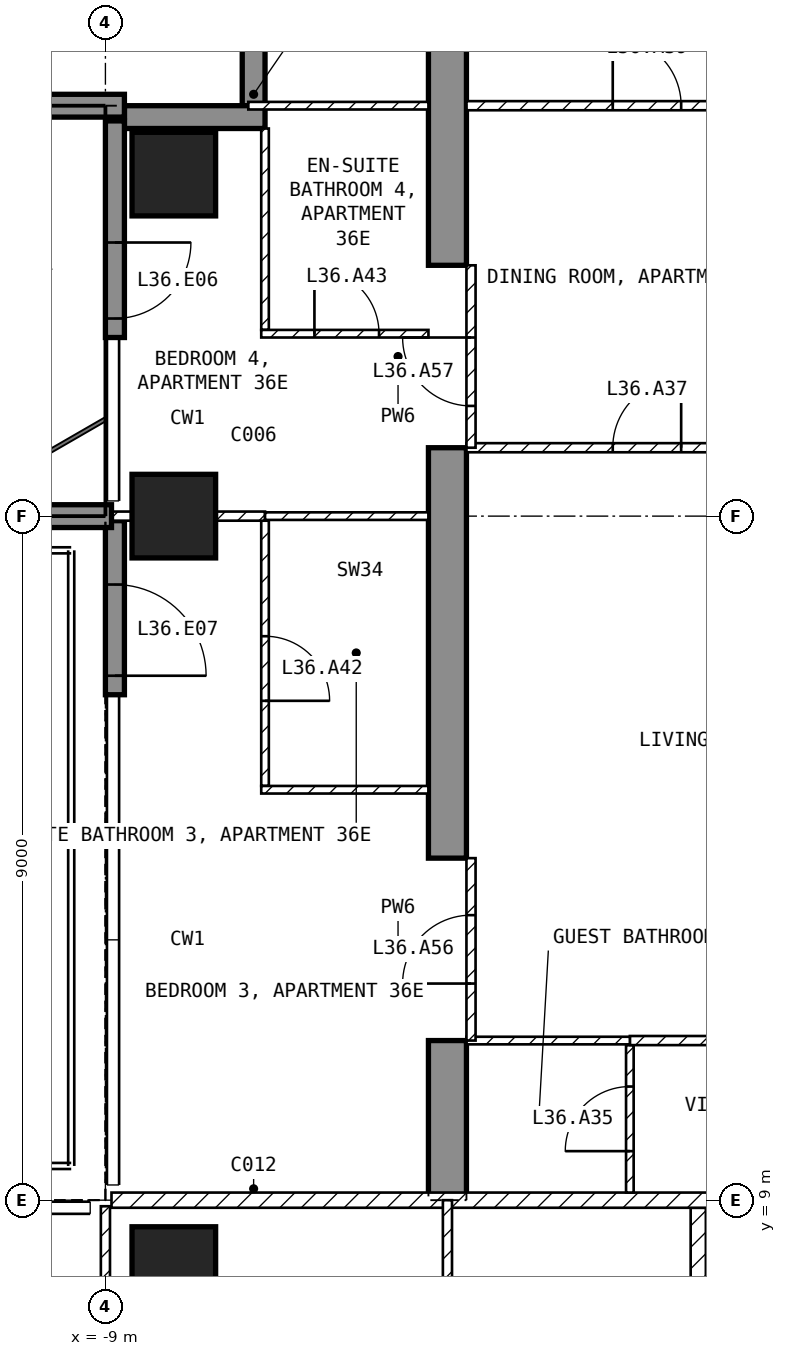
"""IFC4 building model, lengths in metres.
Left out: names, types, materials, properties, quantities, classifications, styles, units other than length and angle.
Written with IfcOpenShell. Run it as: python <this file> out.ifc"""

import sys

from ifc_helpers import new_model, si_unit, direction, frame, frame_2d, origin, origin_2d, place, context, subcontext, project, spatial, polyline, rectangle, outline, extrude, element, fill, save


model = new_model("IFC4")
c1 = context("Model", 3, precision=1e-05, world=origin(), true_north=direction((0.0, 1.0)))
c2 = subcontext(c1, "Body", "Model", "MODEL_VIEW")
j1 = project(units=[si_unit("LENGTHUNIT", "METRE"), si_unit("PLANEANGLEUNIT", "RADIAN")], contexts=[c1])
p1 = place(None, origin())
s1 = spatial("IfcSite", under=j1, at=p1, CompositionType="ELEMENT")
p2 = place(p1, origin())
s2 = spatial("IfcBuilding", under=s1, at=p2, CompositionType="ELEMENT")
p3 = place(p2, frame((0.0, 0.0, 147.9)))
s3 = spatial("IfcBuildingStorey", under=s2, at=p3, CompositionType="ELEMENT", Elevation=147.9)
for number, where, z_axis, x_axis in (
    (1, (-8.1, 8.1, -0.25), (0.0, 0.0, 1.0), (1.0, 0.0, 0.0)),
    (2, (-8.1, 18.0, -0.25), (0.0, 0.0, 1.0), (1.0, 0.0, 0.0)),
    (3, (-8.1, 22.5, -0.25), (0.0, 0.0, 1.0), (1.0, 0.0, 0.0)),
):
    element("IfcColumn", number, at=place(p3, frame(where, z_axis=z_axis, x_axis=x_axis)), inside=s3, PredefinedType="COLUMN", context=c2, shape_type="SweptSolid", body=[
        extrude(rectangle(XDim=1.1, YDim=1.1, at=origin_2d()), origin(), (0.0, 0.0, 1.0), 3.5),
    ])
p4 = place(p3, frame((-4.75, 9.0, -0.25), z_axis=(1.0, 0.0, 0.0), x_axis=(0.0, 1.0, 0.0)))
e4 = element("IfcWall", 4, at=p4, inside=s3, PredefinedType="SHEAR", context=c2, shape_type="SweptSolid", body=[
    extrude(outline(polyline([(0.0, 0.0), (2.1, 0.0), (2.1, 2.65), (4.5, 2.65), (4.5, 0.0), (9.9, 0.0), (9.9, 2.65), (12.3, 2.65), (12.3, 0.0), (16.55, 0.0), (16.55, 3.5), (0.0, 3.5), (0.0, 0.0)])), origin(), (0.0, 0.0, 1.0), 0.5),
])
p5 = place(p3, frame((-8.875, 23.2, 0.0), z_axis=(0.0, 0.0, 1.0), x_axis=(0.0, -1.0, 0.0)))
e5 = element("IfcWall", 5, at=p5, inside=s3, PredefinedType="SOLIDWALL", context=c2, shape_type="SweptSolid", body=[
    extrude(rectangle(XDim=2.85, YDim=0.25, at=frame_2d((1.425, 0.0))), origin(), (0.0, 0.0, 1.0), 3.25),
])
p6 = place(p5, frame((1.6, 0.0, 0.0)))
e6 = element("IfcOpeningElement", 6, at=p6, cuts=e5, PredefinedType="OPENING", context=c2, shape_type="SweptSolid", body=[
    extrude(rectangle(XDim=1.0, YDim=2.4, at=frame_2d((0.5, 1.2))), frame((0.0, 0.135, 0.0), z_axis=(0.0, -1.0, 0.0), x_axis=(1.0, 0.0, 0.0)), (0.0, 0.0, 1.0), 0.27),
])
p7 = place(p3, frame((-8.875, 17.94, 0.0), z_axis=(0.0, 0.0, 1.0), x_axis=(0.0, -1.0, 0.0)))
e7 = element("IfcWall", 7, at=p7, inside=s3, PredefinedType="SOLIDWALL", context=c2, shape_type="SweptSolid", body=[
    extrude(rectangle(XDim=2.29, YDim=0.25, at=frame_2d((1.145, 0.0))), origin(), (0.0, 0.0, 1.0), 3.25),
])
p8 = place(p7, frame((0.84, 0.0, 0.0)))
e8 = element("IfcOpeningElement", 8, at=p8, cuts=e7, PredefinedType="OPENING", context=c2, shape_type="SweptSolid", body=[
    extrude(rectangle(XDim=1.2, YDim=2.4, at=frame_2d((0.6, 1.2))), frame((0.0, 0.135, 0.0), z_axis=(0.0, -1.0, 0.0), x_axis=(1.0, 0.0, 0.0)), (0.0, 0.0, 1.0), 0.27),
])
p9 = place(p3, frame((-7.05, 25.2, 0.0), z_axis=(0.0, 0.0, 1.0), x_axis=(0.0, -1.0, 0.0)))
e9 = element("IfcWall", 9, at=p9, inside=s3, PredefinedType="SOLIDWALL", context=c2, shape_type="SweptSolid", body=[
    extrude(rectangle(XDim=1.8, YDim=0.3, at=frame_2d((0.9, 0.0))), origin(), (0.0, 0.0, 1.0), 3.25),
])
p10 = place(p3, frame((-6.9, 23.25, 0.0), z_axis=(0.0, 0.0, 1.0), x_axis=(-1.0, 0.0, 0.0)))
e10 = element("IfcWall", 10, at=p10, inside=s3, PredefinedType="SOLIDWALL", context=c2, shape_type="SweptSolid", body=[
    extrude(rectangle(XDim=1.85, YDim=0.3, at=frame_2d((0.925, 0.0))), origin(), (0.0, 0.0, 1.0), 3.25),
])
p11 = place(p3, frame((-8.92, 18.0, 0.0), z_axis=(0.0, 0.0, 1.0), x_axis=(-1.0, 0.0, 0.0)))
e11 = element("IfcWall", 11, at=p11, inside=s3, PredefinedType="SOLIDWALL", context=c2, shape_type="SweptSolid", body=[
    extrude(rectangle(XDim=2.82, YDim=0.3, at=frame_2d((1.41, 0.0))), origin(), (0.0, 0.0, 1.0), 3.25),
])
p12 = place(p3, frame((-8.75, 23.4, 0.0), z_axis=(0.0, 0.0, 1.0), x_axis=(-1.0, 0.0, 0.0)))
e12 = element("IfcWall", 12, at=p12, inside=s3, PredefinedType="SOLIDWALL", context=c2, shape_type="SweptSolid", body=[
    extrude(rectangle(XDim=2.95, YDim=0.3, at=frame_2d((1.475, 0.0))), origin(), (0.0, 0.0, 1.0), 3.25),
])
p13 = place(p3, frame((-1.2, 4.6, 0.0), z_axis=(0.0, 0.0, 1.0), x_axis=(0.0, 1.0, 0.0)))
e13 = element("IfcWall", 13, at=p13, inside=s3, PredefinedType="PARTITIONING", context=c2, shape_type="SweptSolid", body=[
    extrude(rectangle(XDim=4.3, YDim=0.2, at=frame_2d((2.15, 0.0))), origin(), (0.0, 0.0, 1.0), 3.25),
])
p14 = place(p3, frame((-8.92, 9.0, 0.0), z_axis=(0.0, 0.0, 1.0), x_axis=(1.0, 0.0, 0.0)))
e14 = element("IfcWall", 14, at=p14, inside=s3, PredefinedType="PARTITIONING", context=c2, shape_type="SweptSolid", body=[
    extrude(rectangle(XDim=17.84, YDim=0.2, at=frame_2d((8.92, 0.0))), origin(), (0.0, 0.0, 1.0), 3.25),
])
p15 = place(p14, frame((8.42, 0.0, 0.0)))
e15 = element("IfcOpeningElement", 15, at=p15, cuts=e14, PredefinedType="OPENING", context=c2, shape_type="SweptSolid", body=[
    extrude(rectangle(XDim=1.0, YDim=2.1, at=frame_2d((0.5, 1.05))), frame((0.0, 0.11, 0.0), z_axis=(0.0, -1.0, 0.0), x_axis=(1.0, 0.0, 0.0)), (0.0, 0.0, 1.0), 0.22),
])
p16 = place(p3, frame((-9.0, 8.92, 0.0), z_axis=(0.0, 0.0, 1.0), x_axis=(0.0, -1.0, 0.0)))
e16 = element("IfcWall", 16, at=p16, inside=s3, PredefinedType="PARTITIONING", context=c2, shape_type="SweptSolid", body=[
    extrude(rectangle(XDim=7.62, YDim=0.12, at=frame_2d((3.81, 0.0))), origin(), (0.0, 0.0, 1.0), 3.25),
])
p17 = place(p16, frame((5.87, 0.0, 0.0)))
e17 = element("IfcOpeningElement", 17, at=p17, cuts=e16, PredefinedType="OPENING", context=c2, shape_type="SweptSolid", body=[
    extrude(rectangle(XDim=0.9, YDim=2.1, at=frame_2d((0.45, 1.05))), frame((0.0, 0.07, 0.0), z_axis=(0.0, -1.0, 0.0), x_axis=(1.0, 0.0, 0.0)), (0.0, 0.0, 1.0), 0.14),
])
p18 = place(p3, frame((-4.5, 9.0, 0.0), z_axis=(0.0, 0.0, 1.0), x_axis=(0.0, -1.0, 0.0)))
e18 = element("IfcWall", 18, at=p18, inside=s3, PredefinedType="PARTITIONING", context=c2, shape_type="SweptSolid", body=[
    extrude(rectangle(XDim=4.5, YDim=0.12, at=frame_2d((2.25, 0.0))), origin(), (0.0, 0.0, 1.0), 3.25),
])
p19 = place(p18, frame((1.8, 0.0, 0.0)))
e19 = element("IfcOpeningElement", 19, at=p19, cuts=e18, PredefinedType="OPENING", context=c2, shape_type="SweptSolid", body=[
    extrude(rectangle(XDim=0.9, YDim=2.1, at=frame_2d((0.45, 1.05))), frame((0.0, 0.07, 0.0), z_axis=(0.0, -1.0, 0.0), x_axis=(1.0, 0.0, 0.0)), (0.0, 0.0, 1.0), 0.14),
])
p20 = place(p3, frame((-2.1, 9.1, 0.0), z_axis=(0.0, 0.0, 1.0), x_axis=(0.0, 1.0, 0.0)))
e20 = element("IfcWall", 20, at=p20, inside=s3, PredefinedType="PARTITIONING", context=c2, shape_type="SweptSolid", body=[
    extrude(rectangle(XDim=1.94, YDim=0.1, at=frame_2d((0.97, 0.0))), origin(), (0.0, 0.0, 1.0), 3.25),
])
p21 = place(p20, frame((0.545, 0.0, 0.0)))
e21 = element("IfcOpeningElement", 21, at=p21, cuts=e20, PredefinedType="OPENING", context=c2, shape_type="SweptSolid", body=[
    extrude(rectangle(XDim=0.85, YDim=2.1, at=frame_2d((0.425, 1.05))), frame((0.0, 0.06, 0.0), z_axis=(0.0, -1.0, 0.0), x_axis=(1.0, 0.0, 0.0)), (0.0, 0.0, 1.0), 0.12),
])
p22 = place(p3, frame((-2.1, 11.1, 0.0), z_axis=(0.0, 0.0, 1.0), x_axis=(1.0, 0.0, 0.0)))
e22 = element("IfcWall", 22, at=p22, inside=s3, PredefinedType="PARTITIONING", context=c2, shape_type="SweptSolid", body=[
    extrude(rectangle(XDim=6.35, YDim=0.12, at=frame_2d((3.175, 0.0))), origin(), (0.0, 0.0, 1.0), 3.25),
])
p23 = place(p22, frame((2.725, 0.0, 0.0)))
e23 = element("IfcOpeningElement", 23, at=p23, cuts=e22, PredefinedType="OPENING", context=c2, shape_type="SweptSolid", body=[
    extrude(rectangle(XDim=0.9, YDim=2.1, at=frame_2d((0.45, 1.05))), frame((0.0, 0.07, 0.0), z_axis=(0.0, -1.0, 0.0), x_axis=(1.0, 0.0, 0.0)), (0.0, 0.0, 1.0), 0.14),
])
p24 = place(p3, frame((-4.25, 11.1, 0.0), z_axis=(0.0, 0.0, 1.0), x_axis=(1.0, 0.0, 0.0)))
e24 = element("IfcWall", 24, at=p24, inside=s3, PredefinedType="PARTITIONING", context=c2, shape_type="SweptSolid", body=[
    extrude(rectangle(XDim=2.15, YDim=0.1, at=frame_2d((1.075, 0.0))), origin(), (0.0, 0.0, 1.0), 3.25),
])
p25 = place(p3, frame((-4.25, 18.9, 0.0), z_axis=(0.0, 0.0, 1.0), x_axis=(1.0, 0.0, 0.0)))
e25 = element("IfcWall", 25, at=p25, inside=s3, PredefinedType="PARTITIONING", context=c2, shape_type="SweptSolid", body=[
    extrude(rectangle(XDim=8.5, YDim=0.12, at=frame_2d((4.25, 0.0))), origin(), (0.0, 0.0, 1.0), 3.25),
])
p26 = place(p25, frame((1.925, 0.0, 0.0)))
e26 = element("IfcOpeningElement", 26, at=p26, cuts=e25, PredefinedType="OPENING", context=c2, shape_type="SweptSolid", body=[
    extrude(rectangle(XDim=0.9, YDim=2.1, at=frame_2d((0.45, 1.05))), frame((0.0, 0.07, 0.0), z_axis=(0.0, -1.0, 0.0), x_axis=(1.0, 0.0, 0.0)), (0.0, 0.0, 1.0), 0.14),
])
p27 = place(p3, frame((-4.25, 23.4, 0.0), z_axis=(0.0, 0.0, 1.0), x_axis=(1.0, 0.0, 0.0)))
e27 = element("IfcWall", 27, at=p27, inside=s3, PredefinedType="PARTITIONING", context=c2, shape_type="SweptSolid", body=[
    extrude(rectangle(XDim=8.5, YDim=0.12, at=frame_2d((4.25, 0.0))), origin(), (0.0, 0.0, 1.0), 3.25),
])
p28 = place(p27, frame((1.925, 0.0, 0.0)))
e28 = element("IfcOpeningElement", 28, at=p28, cuts=e27, PredefinedType="OPENING", context=c2, shape_type="SweptSolid", body=[
    extrude(rectangle(XDim=0.9, YDim=2.1, at=frame_2d((0.45, 1.05))), frame((0.0, 0.07, 0.0), z_axis=(0.0, -1.0, 0.0), x_axis=(1.0, 0.0, 0.0)), (0.0, 0.0, 1.0), 0.14),
])
p29 = place(p3, frame((-6.9, 17.94, 0.0), z_axis=(0.0, 0.0, 1.0), x_axis=(0.0, -1.0, 0.0)))
e29 = element("IfcWall", 29, at=p29, inside=s3, PredefinedType="PARTITIONING", context=c2, shape_type="SweptSolid", body=[
    extrude(rectangle(XDim=3.49, YDim=0.1, at=frame_2d((1.745, 0.0))), origin(), (0.0, 0.0, 1.0), 3.25),
])
p30 = place(p29, frame((1.52, 0.0, 0.0)))
e30 = element("IfcOpeningElement", 30, at=p30, cuts=e29, PredefinedType="OPENING", context=c2, shape_type="SweptSolid", body=[
    extrude(rectangle(XDim=0.85, YDim=2.1, at=frame_2d((0.425, 1.05))), frame((0.0, 0.06, 0.0), z_axis=(0.0, -1.0, 0.0), x_axis=(1.0, 0.0, 0.0)), (0.0, 0.0, 1.0), 0.12),
])
p31 = place(p3, frame((-6.95, 14.4, 0.0), z_axis=(0.0, 0.0, 1.0), x_axis=(1.0, 0.0, 0.0)))
e31 = element("IfcWall", 31, at=p31, inside=s3, PredefinedType="PARTITIONING", context=c2, shape_type="SweptSolid", body=[
    extrude(rectangle(XDim=2.2, YDim=0.1, at=frame_2d((1.1, 0.0))), origin(), (0.0, 0.0, 1.0), 3.25),
])
p32 = place(p3, frame((-8.92, 18.0, 0.0), z_axis=(0.0, 0.0, 1.0), x_axis=(1.0, 0.0, 0.0)))
e32 = element("IfcWall", 32, at=p32, inside=s3, PredefinedType="PARTITIONING", context=c2, shape_type="SweptSolid", body=[
    extrude(rectangle(XDim=2.02, YDim=0.12, at=frame_2d((1.01, 0.0))), origin(), (0.0, 0.0, 1.0), 2.414),
])
p33 = place(p3, frame((-6.9, 18.0, 0.0), z_axis=(0.0, 0.0, 1.0), x_axis=(1.0, 0.0, 0.0)))
e33 = element("IfcWall", 33, at=p33, inside=s3, PredefinedType="PARTITIONING", context=c2, shape_type="SweptSolid", body=[
    extrude(rectangle(XDim=2.15, YDim=0.1, at=frame_2d((1.075, 0.0))), origin(), (0.0, 0.0, 1.0), 2.414),
])
p34 = place(p3, frame((-6.9, 23.1, 0.0), z_axis=(0.0, 0.0, 1.0), x_axis=(0.0, -1.0, 0.0)))
e34 = element("IfcWall", 34, at=p34, inside=s3, PredefinedType="PARTITIONING", context=c2, shape_type="SweptSolid", body=[
    extrude(rectangle(XDim=2.65, YDim=0.1, at=frame_2d((1.325, 0.0))), origin(), (0.0, 0.0, 1.0), 3.25),
])
p35 = place(p3, frame((-6.95, 20.4, 0.0), z_axis=(0.0, 0.0, 1.0), x_axis=(1.0, 0.0, 0.0)))
e35 = element("IfcWall", 35, at=p35, inside=s3, PredefinedType="PARTITIONING", context=c2, shape_type="SweptSolid", body=[
    extrude(rectangle(XDim=2.2, YDim=0.1, at=frame_2d((1.1, 0.0))), origin(), (0.0, 0.0, 1.0), 3.25),
])
p36 = place(p35, frame((0.7, 0.0, 0.0)))
e36 = element("IfcOpeningElement", 36, at=p36, cuts=e35, PredefinedType="OPENING", context=c2, shape_type="SweptSolid", body=[
    extrude(rectangle(XDim=0.85, YDim=2.1, at=frame_2d((0.425, 1.05))), frame((0.0, 0.06, 0.0), z_axis=(0.0, -1.0, 0.0), x_axis=(1.0, 0.0, 0.0)), (0.0, 0.0, 1.0), 0.12),
])
p37 = place(p3, frame((-7.12, 23.4, 0.0), z_axis=(0.0, 0.0, 1.0), x_axis=(1.0, 0.0, 0.0)))
e37 = element("IfcWall", 37, at=p37, inside=s3, PredefinedType="PARTITIONING", context=c2, shape_type="SweptSolid", body=[
    extrude(rectangle(XDim=2.37, YDim=0.1, at=frame_2d((1.185, 0.0))), origin(), (0.0, 0.0, 1.0), 3.25),
])
p38 = place(p3, frame((-4.19, 11.1, 0.0), z_axis=(0.0, 0.0, 1.0), x_axis=(0.0, 1.0, 0.0)))
e38 = element("IfcWall", 38, at=p38, inside=s3, PredefinedType="PARTITIONING", context=c2, shape_type="SweptSolid", body=[
    extrude(rectangle(XDim=2.4, YDim=0.12, at=frame_2d((1.2, 0.0))), origin(), (0.0, 0.0, 1.0), 2.4),
])
p39 = place(p38, frame((0.75, 0.0, 0.0)))
e39 = element("IfcOpeningElement", 39, at=p39, cuts=e38, PredefinedType="OPENING", context=c2, shape_type="SweptSolid", body=[
    extrude(rectangle(XDim=0.9, YDim=2.1, at=frame_2d((0.45, 1.05))), frame((0.0, 0.07, 0.0), z_axis=(0.0, -1.0, 0.0), x_axis=(1.0, 0.0, 0.0)), (0.0, 0.0, 1.0), 0.14),
])
p40 = place(p3, frame((-4.19, 18.9, 0.0), z_axis=(0.0, 0.0, 1.0), x_axis=(0.0, 1.0, 0.0)))
e40 = element("IfcWall", 40, at=p40, inside=s3, PredefinedType="PARTITIONING", context=c2, shape_type="SweptSolid", body=[
    extrude(rectangle(XDim=2.4, YDim=0.12, at=frame_2d((1.2, 0.0))), origin(), (0.0, 0.0, 1.0), 2.4),
])
p41 = place(p40, frame((0.55, 0.0, 0.0)))
e41 = element("IfcOpeningElement", 41, at=p41, cuts=e40, PredefinedType="OPENING", context=c2, shape_type="SweptSolid", body=[
    extrude(rectangle(XDim=0.9, YDim=2.1, at=frame_2d((0.45, 1.05))), frame((0.0, 0.07, 0.0), z_axis=(0.0, -1.0, 0.0), x_axis=(1.0, 0.0, 0.0)), (0.0, 0.0, 1.0), 0.14),
])
p42 = place(p6, origin())
e42 = element("IfcDoor", 42, at=p42, inside=s3, OperationType="SINGLE_SWING_LEFT", PredefinedType="DOOR", context=c2, shape_type="SweptSolid", body=[
    extrude(rectangle(XDim=1.0, YDim=2.4, at=frame_2d((0.5, 1.2))), frame((0.0, 0.025, 0.0), z_axis=(0.0, -1.0, 0.0), x_axis=(1.0, 0.0, 0.0)), (0.0, 0.0, 1.0), 0.05),
])
fill(e6, e42)
p43 = place(p8, origin())
e43 = element("IfcDoor", 43, at=p43, inside=s3, OperationType="SINGLE_SWING_RIGHT", PredefinedType="DOOR", context=c2, shape_type="SweptSolid", body=[
    extrude(rectangle(XDim=1.2, YDim=2.4, at=frame_2d((0.6, 1.2))), frame((0.0, 0.025, 0.0), z_axis=(0.0, -1.0, 0.0), x_axis=(1.0, 0.0, 0.0)), (0.0, 0.0, 1.0), 0.05),
])
fill(e8, e43)
p44 = place(p21, origin())
e44 = element("IfcDoor", 44, at=p44, inside=s3, OperationType="SINGLE_SWING_LEFT", PredefinedType="DOOR", context=c2, shape_type="SweptSolid", body=[
    extrude(rectangle(XDim=0.85, YDim=2.1, at=frame_2d((0.425, 1.05))), frame((0.0, 0.025, 0.0), z_axis=(0.0, -1.0, 0.0), x_axis=(1.0, 0.0, 0.0)), (0.0, 0.0, 1.0), 0.05),
])
fill(e21, e44)
p45 = place(p26, origin())
e45 = element("IfcDoor", 45, at=p45, inside=s3, OperationType="SINGLE_SWING_RIGHT", PredefinedType="DOOR", context=c2, shape_type="SweptSolid", body=[
    extrude(rectangle(XDim=0.9, YDim=2.1, at=frame_2d((0.45, 1.05))), frame((0.0, 0.025, 0.0), z_axis=(0.0, -1.0, 0.0), x_axis=(1.0, 0.0, 0.0)), (0.0, 0.0, 1.0), 0.05),
])
fill(e26, e45)
p46 = place(p28, origin())
e46 = element("IfcDoor", 46, at=p46, inside=s3, OperationType="SINGLE_SWING_LEFT", PredefinedType="DOOR", context=c2, shape_type="SweptSolid", body=[
    extrude(rectangle(XDim=0.9, YDim=2.1, at=frame_2d((0.45, 1.05))), frame((0.0, 0.025, 0.0), z_axis=(0.0, -1.0, 0.0), x_axis=(1.0, 0.0, 0.0)), (0.0, 0.0, 1.0), 0.05),
])
fill(e28, e46)
p47 = place(p30, origin())
e47 = element("IfcDoor", 47, at=p47, inside=s3, OperationType="SINGLE_SWING_RIGHT", PredefinedType="DOOR", context=c2, shape_type="SweptSolid", body=[
    extrude(rectangle(XDim=0.85, YDim=2.1, at=frame_2d((0.425, 1.05))), frame((0.0, 0.025, 0.0), z_axis=(0.0, -1.0, 0.0), x_axis=(1.0, 0.0, 0.0)), (0.0, 0.0, 1.0), 0.05),
])
fill(e30, e47)
p48 = place(p36, origin())
e48 = element("IfcDoor", 48, at=p48, inside=s3, OperationType="SINGLE_SWING_LEFT", PredefinedType="DOOR", context=c2, shape_type="SweptSolid", body=[
    extrude(rectangle(XDim=0.85, YDim=2.1, at=frame_2d((0.425, 1.05))), frame((0.0, 0.025, 0.0), z_axis=(0.0, -1.0, 0.0), x_axis=(1.0, 0.0, 0.0)), (0.0, 0.0, 1.0), 0.05),
])
fill(e36, e48)
p49 = place(p39, origin())
e49 = element("IfcDoor", 49, at=p49, inside=s3, OperationType="SINGLE_SWING_LEFT", PredefinedType="DOOR", context=c2, shape_type="SweptSolid", body=[
    extrude(rectangle(XDim=0.9, YDim=2.1, at=frame_2d((0.45, 1.05))), frame((0.0, 0.025, 0.0), z_axis=(0.0, -1.0, 0.0), x_axis=(1.0, 0.0, 0.0)), (0.0, 0.0, 1.0), 0.05),
])
fill(e39, e49)
p50 = place(p41, origin())
e50 = element("IfcDoor", 50, at=p50, inside=s3, OperationType="SINGLE_SWING_RIGHT", PredefinedType="DOOR", context=c2, shape_type="SweptSolid", body=[
    extrude(rectangle(XDim=0.9, YDim=2.1, at=frame_2d((0.45, 1.05))), frame((0.0, 0.025, 0.0), z_axis=(0.0, -1.0, 0.0), x_axis=(1.0, 0.0, 0.0)), (0.0, 0.0, 1.0), 0.05),
])
fill(e41, e50)
save(model, sys.argv[1])
